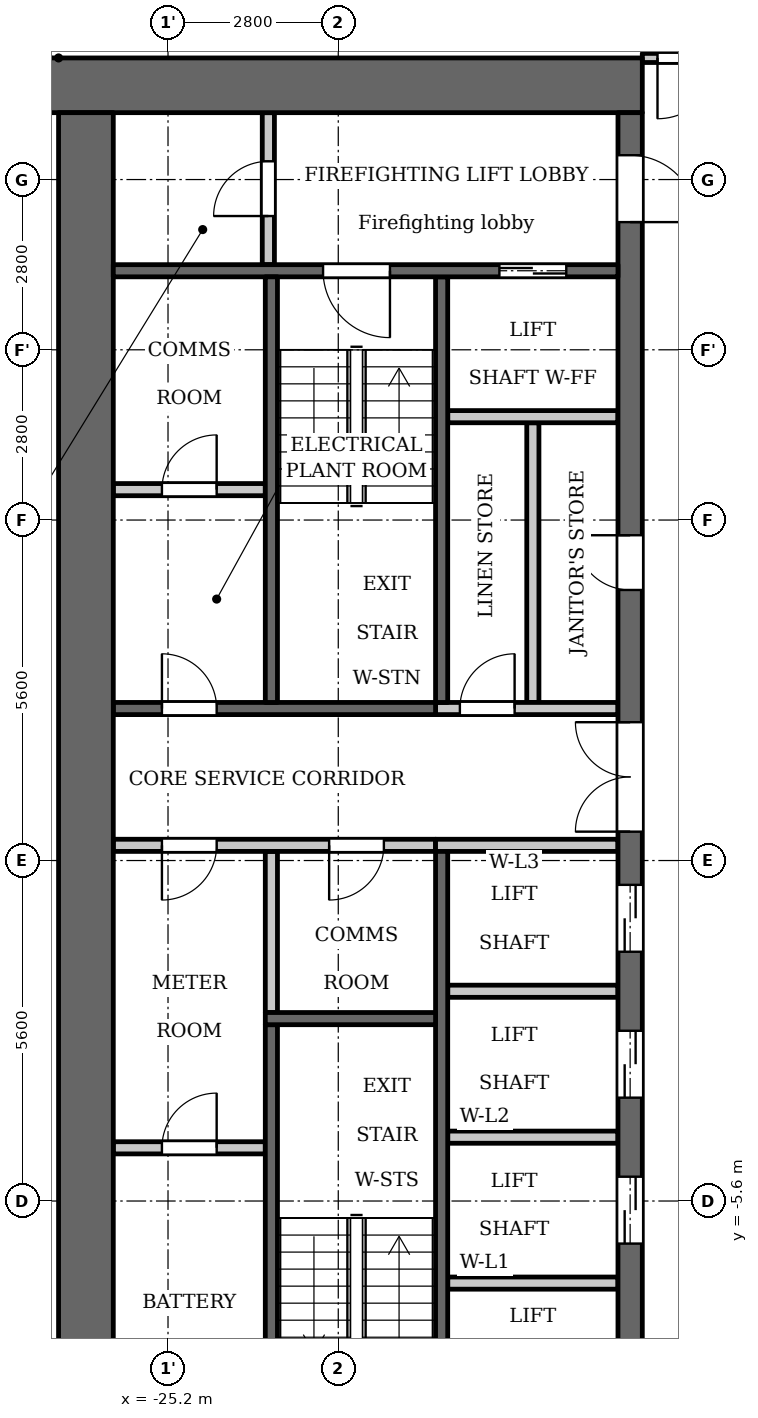
"""IFC4 building model, lengths in metres.
Left out: names, types, materials, properties, quantities, classifications, styles, units other than length and angle.
Written with IfcOpenShell. Run it as: python <this file> out.ifc"""

import sys

from ifc_helpers import new_model, si_unit, direction, frame, frame_2d, origin, place, context, subcontext, project, spatial, rectangle, extrude, element, fill, save


model = new_model("IFC4")
c1 = context("Model", 3, precision=1e-05, world=origin(), true_north=direction((0.0, 1.0)))
c2 = subcontext(c1, "Body", "Model", "MODEL_VIEW")
j1 = project(units=[si_unit("LENGTHUNIT", "METRE"), si_unit("PLANEANGLEUNIT", "RADIAN")], contexts=[c1])
p1 = place(None, origin())
s1 = spatial("IfcSite", under=j1, at=p1, CompositionType="ELEMENT")
p2 = place(p1, origin())
s2 = spatial("IfcBuilding", under=s1, at=p2, CompositionType="ELEMENT")
p3 = place(p2, frame((0.0, 0.0, 118.3)))
s3 = spatial("IfcBuildingStorey", under=s2, at=p3, CompositionType="ELEMENT", Elevation=118.3)
p4 = place(p3, frame((-23.5, -2.5, 0.0), z_axis=(0.0, 0.0, 1.0), x_axis=(0.0, 1.0, 0.0)))
e1 = element("IfcWall", 1, at=p4, inside=s3, PredefinedType="PARTITIONING", context=c2, shape_type="SweptSolid", body=[
    extrude(rectangle(XDim=2.65, YDim=0.2, at=frame_2d((1.325, 0.0))), origin(), (0.0, 0.0, 1.0), 3.2),
])
p5 = place(p3, frame((-20.7, 2.6, 0.0), z_axis=(0.0, 0.0, 1.0), x_axis=(0.0, 1.0, 0.0)))
e2 = element("IfcWall", 2, at=p5, inside=s3, PredefinedType="SHEAR", context=c2, shape_type="SweptSolid", body=[
    extrude(rectangle(XDim=7.0, YDim=0.2, at=frame_2d((3.5, 0.0))), origin(), (0.0, 0.0, 1.0), 3.2),
])
p6 = place(p3, frame((-20.7, -9.6, 0.0), z_axis=(0.0, 0.0, 1.0), x_axis=(0.0, 1.0, 0.0)))
e3 = element("IfcWall", 3, at=p6, inside=s3, PredefinedType="SHEAR", context=c2, shape_type="SweptSolid", body=[
    extrude(rectangle(XDim=9.75, YDim=0.2, at=frame_2d((4.875, 0.0))), origin(), (0.0, 0.0, 1.0), 3.2),
])
p7 = place(p3, frame((-20.8, 2.5, 0.0), z_axis=(0.0, 0.0, 1.0), x_axis=(-1.0, 0.0, 0.0)))
e4 = element("IfcWall", 4, at=p7, inside=s3, PredefinedType="SHEAR", context=c2, shape_type="SweptSolid", body=[
    extrude(rectangle(XDim=5.3, YDim=0.2, at=frame_2d((2.65, 0.0))), origin(), (0.0, 0.0, 1.0), 3.2),
])
p8 = place(p7, frame((3.6, 0.0, 0.0)))
e5 = element("IfcOpeningElement", 5, at=p8, cuts=e4, PredefinedType="OPENING", context=c2, shape_type="SweptSolid", body=[
    extrude(rectangle(XDim=0.9, YDim=2.1, at=frame_2d((0.45, 1.05))), frame((0.0, 0.11, 0.0), z_axis=(0.0, -1.0, 0.0), x_axis=(1.0, 0.0, 0.0)), (0.0, 0.0, 1.0), 0.22),
])
p9 = place(p3, frame((-20.8, 0.25, 0.0), z_axis=(0.0, 0.0, 1.0), x_axis=(-1.0, 0.0, 0.0)))
e6 = element("IfcWall", 6, at=p9, inside=s3, PredefinedType="PARTITIONING", context=c2, shape_type="SweptSolid", body=[
    extrude(rectangle(XDim=5.3, YDim=0.2, at=frame_2d((2.65, 0.0))), origin(), (0.0, 0.0, 1.0), 3.2),
])
p10 = place(p9, frame((0.85, 0.0, 0.0)))
e7 = element("IfcOpeningElement", 7, at=p10, cuts=e6, PredefinedType="OPENING", context=c2, shape_type="SweptSolid", body=[
    extrude(rectangle(XDim=0.9, YDim=2.1, at=frame_2d((0.45, 1.05))), frame((0.0, 0.11, 0.0), z_axis=(0.0, -1.0, 0.0), x_axis=(1.0, 0.0, 0.0)), (0.0, 0.0, 1.0), 0.22),
])
p11 = place(p9, frame((3.6, 0.0, 0.0)))
e8 = element("IfcOpeningElement", 8, at=p11, cuts=e6, PredefinedType="OPENING", context=c2, shape_type="SweptSolid", body=[
    extrude(rectangle(XDim=0.9, YDim=2.1, at=frame_2d((0.45, 1.05))), frame((0.0, 0.11, 0.0), z_axis=(0.0, -1.0, 0.0), x_axis=(1.0, 0.0, 0.0)), (0.0, 0.0, 1.0), 0.22),
])
p12 = place(p3, frame((-17.4, 12.75, 0.0), z_axis=(0.0, 0.0, 1.0), x_axis=(-1.0, 0.0, 0.0)))
e9 = element("IfcWall", 9, at=p12, inside=s3, PredefinedType="SHEAR", context=c2, shape_type="SweptSolid", body=[
    extrude(rectangle(XDim=10.4, YDim=0.9, at=frame_2d((5.2, 0.0))), origin(), (0.0, 0.0, 1.0), 3.2),
])
p13 = place(p3, frame((-19.2, 2.6, 0.0), z_axis=(0.0, 0.0, 1.0), x_axis=(0.0, 1.0, 0.0)))
e10 = element("IfcWall", 10, at=p13, inside=s3, PredefinedType="PARTITIONING", context=c2, shape_type="SweptSolid", body=[
    extrude(rectangle(XDim=4.6, YDim=0.2, at=frame_2d((2.3, 0.0))), origin(), (0.0, 0.0, 1.0), 3.2),
])
p14 = place(p3, frame((-17.6, -12.3, 0.0), z_axis=(0.0, 0.0, 1.0), x_axis=(0.0, 1.0, 0.0)))
e11 = element("IfcWall", 11, at=p14, inside=s3, PredefinedType="SHEAR", context=c2, shape_type="SweptSolid", body=[
    extrude(rectangle(XDim=24.6, YDim=0.4, at=frame_2d((12.3, 0.0))), origin(), (0.0, 0.0, 1.0), 3.2),
])
p15 = place(p14, frame((6.0, 0.0, 0.0)))
e12 = element("IfcOpeningElement", 12, at=p15, cuts=e11, PredefinedType="OPENING", context=c2, shape_type="SweptSolid", body=[
    extrude(rectangle(XDim=1.1, YDim=2.1, at=frame_2d((0.55, 1.05))), frame((0.0, 0.21, 0.0), z_axis=(0.0, -1.0, 0.0), x_axis=(1.0, 0.0, 0.0)), (0.0, 0.0, 1.0), 0.42),
])
p16 = place(p14, frame((8.4, 0.0, 0.0)))
e13 = element("IfcOpeningElement", 13, at=p16, cuts=e11, PredefinedType="OPENING", context=c2, shape_type="SweptSolid", body=[
    extrude(rectangle(XDim=1.1, YDim=2.1, at=frame_2d((0.55, 1.05))), frame((0.0, 0.21, 0.0), z_axis=(0.0, -1.0, 0.0), x_axis=(1.0, 0.0, 0.0)), (0.0, 0.0, 1.0), 0.42),
])
p17 = place(p14, frame((10.8, 0.0, 0.0)))
e14 = element("IfcOpeningElement", 14, at=p17, cuts=e11, PredefinedType="OPENING", context=c2, shape_type="SweptSolid", body=[
    extrude(rectangle(XDim=1.1, YDim=2.1, at=frame_2d((0.55, 1.05))), frame((0.0, 0.21, 0.0), z_axis=(0.0, -1.0, 0.0), x_axis=(1.0, 0.0, 0.0)), (0.0, 0.0, 1.0), 0.42),
])
p18 = place(p14, frame((16.75, 0.0, 0.0)))
e15 = element("IfcOpeningElement", 15, at=p18, cuts=e11, PredefinedType="OPENING", context=c2, shape_type="SweptSolid", body=[
    extrude(rectangle(XDim=0.9, YDim=2.1, at=frame_2d((0.45, 1.05))), frame((0.0, 0.21, 0.0), z_axis=(0.0, -1.0, 0.0), x_axis=(1.0, 0.0, 0.0)), (0.0, 0.0, 1.0), 0.42),
])
p19 = place(p14, frame((22.8, 0.0, 0.0)))
e16 = element("IfcOpeningElement", 16, at=p19, cuts=e11, PredefinedType="OPENING", context=c2, shape_type="SweptSolid", body=[
    extrude(rectangle(XDim=1.1, YDim=2.1, at=frame_2d((0.55, 1.05))), frame((0.0, 0.21, 0.0), z_axis=(0.0, -1.0, 0.0), x_axis=(1.0, 0.0, 0.0)), (0.0, 0.0, 1.0), 0.42),
])
p20 = place(p14, frame((0.7, 0.0, 0.0)))
e17 = element("IfcOpeningElement", 17, at=p20, cuts=e11, PredefinedType="OPENING", context=c2, shape_type="SweptSolid", body=[
    extrude(rectangle(XDim=1.1, YDim=2.1, at=frame_2d((0.55, 1.05))), frame((0.0, 0.21, 0.0), z_axis=(0.0, -1.0, 0.0), x_axis=(1.0, 0.0, 0.0)), (0.0, 0.0, 1.0), 0.42),
])
p21 = place(p14, frame((12.775, 0.0, 0.0)))
e18 = element("IfcOpeningElement", 18, at=p21, cuts=e11, PredefinedType="OPENING", context=c2, shape_type="SweptSolid", body=[
    extrude(rectangle(XDim=1.8, YDim=2.1, at=frame_2d((0.9, 1.05))), frame((0.0, 0.21, 0.0), z_axis=(0.0, -1.0, 0.0), x_axis=(1.0, 0.0, 0.0)), (0.0, 0.0, 1.0), 0.42),
])
p22 = place(p3, frame((-26.55, -12.3, 0.0), z_axis=(0.0, 0.0, 1.0), x_axis=(0.0, 1.0, 0.0)))
e19 = element("IfcWall", 19, at=p22, inside=s3, PredefinedType="SHEAR", context=c2, shape_type="SweptSolid", body=[
    extrude(rectangle(XDim=24.6, YDim=0.9, at=frame_2d((12.3, 0.0))), origin(), (0.0, 0.0, 1.0), 3.2),
])
p23 = place(p3, frame((-23.55, 9.8, 0.0), z_axis=(0.0, 0.0, 1.0), x_axis=(0.0, 1.0, 0.0)))
e20 = element("IfcWall", 20, at=p23, inside=s3, PredefinedType="PARTITIONING", context=c2, shape_type="SweptSolid", body=[
    extrude(rectangle(XDim=2.5, YDim=0.2, at=frame_2d((1.25, 0.0))), origin(), (0.0, 0.0, 1.0), 3.2),
])
p24 = place(p23, frame((0.8, 0.0, 0.0)))
e21 = element("IfcOpeningElement", 21, at=p24, cuts=e20, PredefinedType="OPENING", context=c2, shape_type="SweptSolid", body=[
    extrude(rectangle(XDim=0.9, YDim=2.1, at=frame_2d((0.45, 1.05))), frame((0.0, 0.11, 0.0), z_axis=(0.0, -1.0, 0.0), x_axis=(1.0, 0.0, 0.0)), (0.0, 0.0, 1.0), 0.22),
])
p25 = place(p3, frame((-23.6, -4.725, 0.0), z_axis=(0.0, 0.0, 1.0), x_axis=(-1.0, 0.0, 0.0)))
e22 = element("IfcWall", 22, at=p25, inside=s3, PredefinedType="PARTITIONING", context=c2, shape_type="SweptSolid", body=[
    extrude(rectangle(XDim=2.5, YDim=0.2, at=frame_2d((1.25, 0.0))), origin(), (0.0, 0.0, 1.0), 3.2),
])
p26 = place(p25, frame((0.8, 0.0, 0.0)))
e23 = element("IfcOpeningElement", 23, at=p26, cuts=e22, PredefinedType="OPENING", context=c2, shape_type="SweptSolid", body=[
    extrude(rectangle(XDim=0.9, YDim=2.1, at=frame_2d((0.45, 1.05))), frame((0.0, 0.11, 0.0), z_axis=(0.0, -1.0, 0.0), x_axis=(1.0, 0.0, 0.0)), (0.0, 0.0, 1.0), 0.22),
])
p27 = place(p3, frame((-23.6, 6.1, 0.0), z_axis=(0.0, 0.0, 1.0), x_axis=(-1.0, 0.0, 0.0)))
e24 = element("IfcWall", 24, at=p27, inside=s3, PredefinedType="PARTITIONING", context=c2, shape_type="SweptSolid", body=[
    extrude(rectangle(XDim=2.5, YDim=0.2, at=frame_2d((1.25, 0.0))), origin(), (0.0, 0.0, 1.0), 3.2),
])
p28 = place(p27, frame((0.8, 0.0, 0.0)))
e25 = element("IfcOpeningElement", 25, at=p28, cuts=e24, PredefinedType="OPENING", context=c2, shape_type="SweptSolid", body=[
    extrude(rectangle(XDim=0.9, YDim=2.1, at=frame_2d((0.45, 1.05))), frame((0.0, 0.11, 0.0), z_axis=(0.0, -1.0, 0.0), x_axis=(1.0, 0.0, 0.0)), (0.0, 0.0, 1.0), 0.22),
])
for number, where, z_axis, x_axis in (
    (26, (-17.8, -6.95, 0.0), (0.0, 0.0, 1.0), (-1.0, 0.0, 0.0)),
    (27, (-17.8, -4.55, 0.0), (0.0, 0.0, 1.0), (-1.0, 0.0, 0.0)),
    (28, (-17.8, -2.15, 0.0), (0.0, 0.0, 1.0), (-1.0, 0.0, 0.0)),
):
    element("IfcWall", number, at=place(p3, frame(where, z_axis=z_axis, x_axis=x_axis)), inside=s3, PredefinedType="PARTITIONING", context=c2, shape_type="SweptSolid", body=[
        extrude(rectangle(XDim=2.8, YDim=0.2, at=frame_2d((1.4, 0.0))), origin(), (0.0, 0.0, 1.0), 3.2),
    ])
p29 = place(p3, frame((-17.8, 0.25, 0.0), z_axis=(0.0, 0.0, 1.0), x_axis=(-1.0, 0.0, 0.0)))
e29 = element("IfcWall", 29, at=p29, inside=s3, PredefinedType="PARTITIONING", context=c2, shape_type="SweptSolid", body=[
    extrude(rectangle(XDim=3.0, YDim=0.2, at=frame_2d((1.5, 0.0))), origin(), (0.0, 0.0, 1.0), 3.2),
])
p30 = place(p3, frame((-17.8, 2.5, 0.0), z_axis=(0.0, 0.0, 1.0), x_axis=(-1.0, 0.0, 0.0)))
e30 = element("IfcWall", 30, at=p30, inside=s3, PredefinedType="PARTITIONING", context=c2, shape_type="SweptSolid", body=[
    extrude(rectangle(XDim=3.0, YDim=0.2, at=frame_2d((1.5, 0.0))), origin(), (0.0, 0.0, 1.0), 3.2),
])
p31 = place(p30, frame((1.7, 0.0, 0.0)))
e31 = element("IfcOpeningElement", 31, at=p31, cuts=e30, PredefinedType="OPENING", context=c2, shape_type="SweptSolid", body=[
    extrude(rectangle(XDim=0.9, YDim=2.1, at=frame_2d((0.45, 1.05))), frame((0.0, 0.11, 0.0), z_axis=(0.0, -1.0, 0.0), x_axis=(1.0, 0.0, 0.0)), (0.0, 0.0, 1.0), 0.22),
])
p32 = place(p3, frame((-17.8, 7.3, 0.0), z_axis=(0.0, 0.0, 1.0), x_axis=(-1.0, 0.0, 0.0)))
e32 = element("IfcWall", 32, at=p32, inside=s3, PredefinedType="PARTITIONING", context=c2, shape_type="SweptSolid", body=[
    extrude(rectangle(XDim=2.8, YDim=0.2, at=frame_2d((1.4, 0.0))), origin(), (0.0, 0.0, 1.0), 3.2),
])
p33 = place(p3, frame((-17.8, 9.7, 0.0), z_axis=(0.0, 0.0, 1.0), x_axis=(-1.0, 0.0, 0.0)))
e33 = element("IfcWall", 33, at=p33, inside=s3, PredefinedType="SHEAR", context=c2, shape_type="SweptSolid", body=[
    extrude(rectangle(XDim=8.3, YDim=0.2, at=frame_2d((4.15, 0.0))), origin(), (0.0, 0.0, 1.0), 3.2),
])
p34 = place(p33, frame((0.85, 0.0, 0.0)))
e34 = element("IfcOpeningElement", 34, at=p34, cuts=e33, PredefinedType="OPENING", context=c2, shape_type="SweptSolid", body=[
    extrude(rectangle(XDim=1.1, YDim=2.1, at=frame_2d((0.55, 1.05))), frame((0.0, 0.11, 0.0), z_axis=(0.0, -1.0, 0.0), x_axis=(1.0, 0.0, 0.0)), (0.0, 0.0, 1.0), 0.22),
])
p35 = place(p33, frame((3.75, 0.0, 0.0)))
e35 = element("IfcOpeningElement", 35, at=p35, cuts=e33, PredefinedType="OPENING", context=c2, shape_type="SweptSolid", body=[
    extrude(rectangle(XDim=1.1, YDim=2.1, at=frame_2d((0.55, 1.05))), frame((0.0, 0.11, 0.0), z_axis=(0.0, -1.0, 0.0), x_axis=(1.0, 0.0, 0.0)), (0.0, 0.0, 1.0), 0.22),
])
p36 = place(p3, frame((-23.5, 2.6, 0.0), z_axis=(0.0, 0.0, 1.0), x_axis=(0.0, 1.0, 0.0)))
e36 = element("IfcWall", 36, at=p36, inside=s3, PredefinedType="SHEAR", context=c2, shape_type="SweptSolid", body=[
    extrude(rectangle(XDim=7.0, YDim=0.2, at=frame_2d((3.5, 0.0))), origin(), (0.0, 0.0, 1.0), 3.2),
])
p37 = place(p3, frame((-23.5, -9.6, 0.0), z_axis=(0.0, 0.0, 1.0), x_axis=(0.0, 1.0, 0.0)))
e37 = element("IfcWall", 37, at=p37, inside=s3, PredefinedType="SHEAR", context=c2, shape_type="SweptSolid", body=[
    extrude(rectangle(XDim=6.9, YDim=0.2, at=frame_2d((3.45, 0.0))), origin(), (0.0, 0.0, 1.0), 3.2),
])
p38 = place(p3, frame((-20.8, -2.6, 0.0), z_axis=(0.0, 0.0, 1.0), x_axis=(-1.0, 0.0, 0.0)))
e38 = element("IfcWall", 38, at=p38, inside=s3, PredefinedType="SHEAR", context=c2, shape_type="SweptSolid", body=[
    extrude(rectangle(XDim=2.8, YDim=0.2, at=frame_2d((1.4, 0.0))), origin(), (0.0, 0.0, 1.0), 3.2),
])
p39 = place(p3, frame((-17.4, 13.2, 0.0), z_axis=(0.0, 0.0, 1.0), x_axis=(1.0, 0.0, 0.0)))
e39 = element("IfcWall", 39, at=p39, inside=s3, PredefinedType="PARTITIONING", context=c2, shape_type="SweptSolid", body=[
    extrude(rectangle(XDim=34.8, YDim=0.15, at=frame_2d((17.4, 0.0))), origin(), (0.0, 0.0, 1.0), 3.2),
])
p40 = place(p39, frame((0.25, 0.0, 0.0)))
e40 = element("IfcOpeningElement", 40, at=p40, cuts=e39, PredefinedType="OPENING", context=c2, shape_type="SweptSolid", body=[
    extrude(rectangle(XDim=1.0, YDim=2.1, at=frame_2d((0.5, 1.05))), frame((0.0, 0.085, 0.0), z_axis=(0.0, -1.0, 0.0), x_axis=(1.0, 0.0, 0.0)), (0.0, 0.0, 1.0), 0.17),
])
p41 = place(p39, frame((33.65, 0.0, 0.0)))
e41 = element("IfcOpeningElement", 41, at=p41, cuts=e39, PredefinedType="OPENING", context=c2, shape_type="SweptSolid", body=[
    extrude(rectangle(XDim=1.0, YDim=2.1, at=frame_2d((0.5, 1.05))), frame((0.0, 0.085, 0.0), z_axis=(0.0, -1.0, 0.0), x_axis=(1.0, 0.0, 0.0)), (0.0, 0.0, 1.0), 0.17),
])
p42 = place(p39, frame((15.75, 0.0, 0.0)))
e42 = element("IfcOpeningElement", 42, at=p42, cuts=e39, PredefinedType="OPENING", context=c2, shape_type="SweptSolid", body=[
    extrude(rectangle(XDim=1.0, YDim=2.1, at=frame_2d((0.5, 1.05))), frame((0.0, 0.085, 0.0), z_axis=(0.0, -1.0, 0.0), x_axis=(1.0, 0.0, 0.0)), (0.0, 0.0, 1.0), 0.17),
])
p43 = place(p39, frame((18.1, 0.0, 0.0)))
e43 = element("IfcOpeningElement", 43, at=p43, cuts=e39, PredefinedType="OPENING", context=c2, shape_type="SweptSolid", body=[
    extrude(rectangle(XDim=1.0, YDim=2.1, at=frame_2d((0.5, 1.05))), frame((0.0, 0.085, 0.0), z_axis=(0.0, -1.0, 0.0), x_axis=(1.0, 0.0, 0.0)), (0.0, 0.0, 1.0), 0.17),
])
p44 = place(p39, frame((23.55, 0.0, 0.0)))
e44 = element("IfcOpeningElement", 44, at=p44, cuts=e39, PredefinedType="OPENING", context=c2, shape_type="SweptSolid", body=[
    extrude(rectangle(XDim=1.0, YDim=2.1, at=frame_2d((0.5, 1.05))), frame((0.0, 0.085, 0.0), z_axis=(0.0, -1.0, 0.0), x_axis=(1.0, 0.0, 0.0)), (0.0, 0.0, 1.0), 0.17),
])
p45 = place(p15, origin())
e45 = element("IfcDoor", 45, at=p45, inside=s3, OperationType="DOUBLE_DOOR_SLIDING", PredefinedType="DOOR", context=c2, shape_type="SweptSolid", body=[
    extrude(rectangle(XDim=1.1, YDim=2.1, at=frame_2d((0.55, 1.05))), frame((0.0, 0.025, 0.0), z_axis=(0.0, -1.0, 0.0), x_axis=(1.0, 0.0, 0.0)), (0.0, 0.0, 1.0), 0.05),
])
fill(e12, e45)
p46 = place(p16, origin())
e46 = element("IfcDoor", 46, at=p46, inside=s3, OperationType="DOUBLE_DOOR_SLIDING", PredefinedType="DOOR", context=c2, shape_type="SweptSolid", body=[
    extrude(rectangle(XDim=1.1, YDim=2.1, at=frame_2d((0.55, 1.05))), frame((0.0, 0.025, 0.0), z_axis=(0.0, -1.0, 0.0), x_axis=(1.0, 0.0, 0.0)), (0.0, 0.0, 1.0), 0.05),
])
fill(e13, e46)
p47 = place(p17, origin())
e47 = element("IfcDoor", 47, at=p47, inside=s3, OperationType="DOUBLE_DOOR_SLIDING", PredefinedType="DOOR", context=c2, shape_type="SweptSolid", body=[
    extrude(rectangle(XDim=1.1, YDim=2.1, at=frame_2d((0.55, 1.05))), frame((0.0, 0.025, 0.0), z_axis=(0.0, -1.0, 0.0), x_axis=(1.0, 0.0, 0.0)), (0.0, 0.0, 1.0), 0.05),
])
fill(e14, e47)
p48 = place(p18, origin())
e48 = element("IfcDoor", 48, at=p48, inside=s3, OperationType="SINGLE_SWING_LEFT", PredefinedType="DOOR", context=c2, shape_type="SweptSolid", body=[
    extrude(rectangle(XDim=0.9, YDim=2.1, at=frame_2d((0.45, 1.05))), frame((0.0, 0.025, 0.0), z_axis=(0.0, -1.0, 0.0), x_axis=(1.0, 0.0, 0.0)), (0.0, 0.0, 1.0), 0.05),
])
fill(e15, e48)
p49 = place(p31, origin())
e49 = element("IfcDoor", 49, at=p49, inside=s3, OperationType="SINGLE_SWING_LEFT", PredefinedType="DOOR", context=c2, shape_type="SweptSolid", body=[
    extrude(rectangle(XDim=0.9, YDim=2.1, at=frame_2d((0.45, 1.05))), frame((0.0, 0.025, 0.0), z_axis=(0.0, -1.0, 0.0), x_axis=(1.0, 0.0, 0.0)), (0.0, 0.0, 1.0), 0.05),
])
fill(e31, e49)
p50 = place(p34, origin())
e50 = element("IfcDoor", 50, at=p50, inside=s3, OperationType="DOUBLE_DOOR_SLIDING", PredefinedType="DOOR", context=c2, shape_type="SweptSolid", body=[
    extrude(rectangle(XDim=1.1, YDim=2.1, at=frame_2d((0.55, 1.05))), frame((0.0, 0.025, 0.0), z_axis=(0.0, -1.0, 0.0), x_axis=(1.0, 0.0, 0.0)), (0.0, 0.0, 1.0), 0.05),
])
fill(e34, e50)
p51 = place(p19, origin())
e51 = element("IfcDoor", 51, at=p51, inside=s3, OperationType="SINGLE_SWING_LEFT", PredefinedType="DOOR", context=c2, shape_type="SweptSolid", body=[
    extrude(rectangle(XDim=1.1, YDim=2.1, at=frame_2d((0.55, 1.05))), frame((0.0, 0.025, 0.0), z_axis=(0.0, -1.0, 0.0), x_axis=(1.0, 0.0, 0.0)), (0.0, 0.0, 1.0), 0.05),
])
fill(e16, e51)
p52 = place(p24, origin())
e52 = element("IfcDoor", 52, at=p52, inside=s3, OperationType="SINGLE_SWING_RIGHT", PredefinedType="DOOR", context=c2, shape_type="SweptSolid", body=[
    extrude(rectangle(XDim=0.9, YDim=2.1, at=frame_2d((0.45, 1.05))), frame((0.0, 0.025, 0.0), z_axis=(0.0, -1.0, 0.0), x_axis=(1.0, 0.0, 0.0)), (0.0, 0.0, 1.0), 0.05),
])
fill(e21, e52)
p53 = place(p35, origin())
e53 = element("IfcDoor", 53, at=p53, inside=s3, OperationType="SINGLE_SWING_RIGHT", PredefinedType="DOOR", context=c2, shape_type="SweptSolid", body=[
    extrude(rectangle(XDim=1.1, YDim=2.1, at=frame_2d((0.55, 1.05))), frame((0.0, 0.025, 0.0), z_axis=(0.0, -1.0, 0.0), x_axis=(1.0, 0.0, 0.0)), (0.0, 0.0, 1.0), 0.05),
])
fill(e35, e53)
p54 = place(p21, origin())
e54 = element("IfcDoor", 54, at=p54, inside=s3, OperationType="DOUBLE_DOOR_SINGLE_SWING", PredefinedType="DOOR", context=c2, shape_type="SweptSolid", body=[
    extrude(rectangle(XDim=1.8, YDim=2.1, at=frame_2d((0.9, 1.05))), frame((0.0, 0.025, 0.0), z_axis=(0.0, -1.0, 0.0), x_axis=(1.0, 0.0, 0.0)), (0.0, 0.0, 1.0), 0.05),
])
fill(e18, e54)
p55 = place(p10, origin())
e55 = element("IfcDoor", 55, at=p55, inside=s3, OperationType="SINGLE_SWING_LEFT", PredefinedType="DOOR", context=c2, shape_type="SweptSolid", body=[
    extrude(rectangle(XDim=0.9, YDim=2.1, at=frame_2d((0.45, 1.05))), frame((0.0, 0.025, 0.0), z_axis=(0.0, -1.0, 0.0), x_axis=(1.0, 0.0, 0.0)), (0.0, 0.0, 1.0), 0.05),
])
fill(e7, e55)
p56 = place(p26, origin())
e56 = element("IfcDoor", 56, at=p56, inside=s3, OperationType="SINGLE_SWING_LEFT", PredefinedType="DOOR", context=c2, shape_type="SweptSolid", body=[
    extrude(rectangle(XDim=0.9, YDim=2.1, at=frame_2d((0.45, 1.05))), frame((0.0, 0.025, 0.0), z_axis=(0.0, -1.0, 0.0), x_axis=(1.0, 0.0, 0.0)), (0.0, 0.0, 1.0), 0.05),
])
fill(e23, e56)
p57 = place(p11, origin())
e57 = element("IfcDoor", 57, at=p57, inside=s3, OperationType="SINGLE_SWING_LEFT", PredefinedType="DOOR", context=c2, shape_type="SweptSolid", body=[
    extrude(rectangle(XDim=0.9, YDim=2.1, at=frame_2d((0.45, 1.05))), frame((0.0, 0.025, 0.0), z_axis=(0.0, -1.0, 0.0), x_axis=(1.0, 0.0, 0.0)), (0.0, 0.0, 1.0), 0.05),
])
fill(e8, e57)
p58 = place(p28, origin())
e58 = element("IfcDoor", 58, at=p58, inside=s3, OperationType="SINGLE_SWING_LEFT", PredefinedType="DOOR", context=c2, shape_type="SweptSolid", body=[
    extrude(rectangle(XDim=0.9, YDim=2.1, at=frame_2d((0.45, 1.05))), frame((0.0, 0.025, 0.0), z_axis=(0.0, -1.0, 0.0), x_axis=(1.0, 0.0, 0.0)), (0.0, 0.0, 1.0), 0.05),
])
fill(e25, e58)
p59 = place(p8, origin())
e59 = element("IfcDoor", 59, at=p59, inside=s3, OperationType="SINGLE_SWING_RIGHT", PredefinedType="DOOR", context=c2, shape_type="SweptSolid", body=[
    extrude(rectangle(XDim=0.9, YDim=2.1, at=frame_2d((0.45, 1.05))), frame((0.0, 0.025, 0.0), z_axis=(0.0, -1.0, 0.0), x_axis=(1.0, 0.0, 0.0)), (0.0, 0.0, 1.0), 0.05),
])
fill(e5, e59)
p60 = place(p40, origin())
e60 = element("IfcDoor", 60, at=p60, inside=s3, OperationType="SINGLE_SWING_LEFT", PredefinedType="DOOR", context=c2, shape_type="SweptSolid", body=[
    extrude(rectangle(XDim=1.0, YDim=2.1, at=frame_2d((0.5, 1.05))), frame((0.0, 0.025, 0.0), z_axis=(0.0, -1.0, 0.0), x_axis=(1.0, 0.0, 0.0)), (0.0, 0.0, 1.0), 0.05),
])
fill(e40, e60)
save(model, sys.argv[1])
